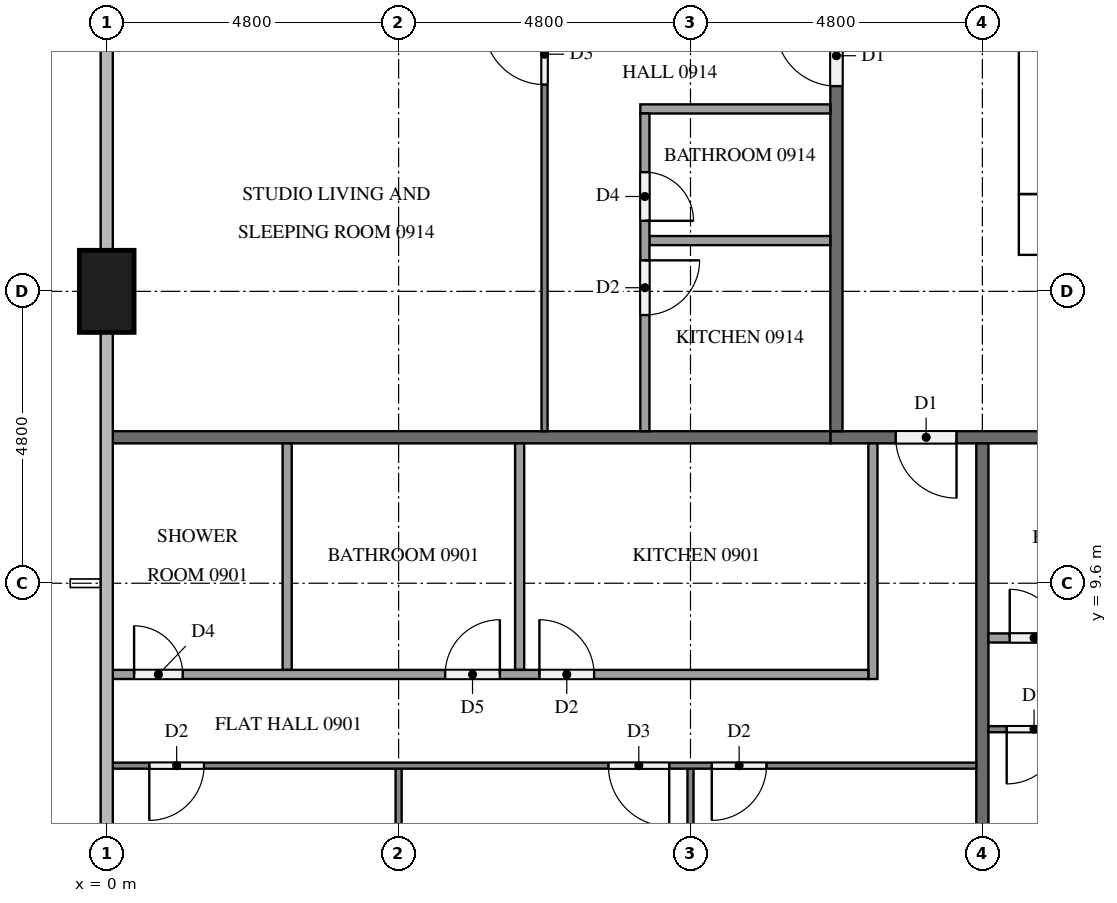
"""IFC4 building model, lengths in metres.
Left out: names, types, materials, properties, quantities, classifications, styles, units other than length and angle.
Written with IfcOpenShell. Run it as: python <this file> out.ifc"""

import sys

from ifc_helpers import new_model, si_unit, direction, frame, frame_2d, origin, origin_2d, place, context, subcontext, project, spatial, rectangle, extrude, element, fill, save


model = new_model("IFC4")
c1 = context("Model", 3, precision=1e-05, world=origin(), true_north=direction((0.0, 1.0)))
c2 = subcontext(c1, "Body", "Model", "MODEL_VIEW")
j1 = project(units=[si_unit("LENGTHUNIT", "METRE"), si_unit("PLANEANGLEUNIT", "RADIAN")], contexts=[c1])
p1 = place(None, origin())
s1 = spatial("IfcSite", under=j1, at=p1, CompositionType="ELEMENT")
p2 = place(p1, origin())
s2 = spatial("IfcBuilding", under=s1, at=p2, CompositionType="ELEMENT")
p3 = place(p2, frame((0.0, 0.0, 39.9)))
s3 = spatial("IfcBuildingStorey", under=s2, at=p3, CompositionType="ELEMENT", Elevation=39.9)
p4 = place(p3, frame((15.0, 15.5, 0.0), z_axis=(0.0, 0.0, 1.0), x_axis=(1.0, 0.0, 0.0)))
e1 = element("IfcWall", 1, at=p4, inside=s3, PredefinedType="SHEAR", context=c2, shape_type="SweptSolid", body=[
    extrude(rectangle(XDim=32.4, YDim=1.0, at=frame_2d((16.2, 0.0))), origin(), (0.0, 0.0, 1.0), 3.2),
])
p5 = place(p4, frame((15.3, 0.0, 0.0)))
e2 = element("IfcOpeningElement", 2, at=p5, cuts=e1, PredefinedType="OPENING", context=c2, shape_type="SweptSolid", body=[
    extrude(rectangle(XDim=1.8, YDim=2.1, at=frame_2d((0.9, 1.05))), frame((0.0, 0.51, 0.0), z_axis=(0.0, -1.0, 0.0), x_axis=(1.0, 0.0, 0.0)), (0.0, 0.0, 1.0), 1.02),
])
p6 = place(p3, frame((15.5, 16.0, 0.0), z_axis=(0.0, 0.0, 1.0), x_axis=(0.0, 1.0, 0.0)))
e3 = element("IfcWall", 3, at=p6, inside=s3, PredefinedType="SHEAR", context=c2, shape_type="SweptSolid", body=[
    extrude(rectangle(XDim=20.8, YDim=1.0, at=frame_2d((10.4, 0.0))), origin(), (0.0, 0.0, 1.0), 3.2),
])
p7 = place(p6, frame((4.76, 0.0, 0.0)))
e4 = element("IfcOpeningElement", 4, at=p7, cuts=e3, PredefinedType="OPENING", context=c2, shape_type="SweptSolid", body=[
    extrude(rectangle(XDim=1.2, YDim=2.1, at=frame_2d((0.6, 1.05))), frame((0.0, 0.51, 0.0), z_axis=(0.0, -1.0, 0.0), x_axis=(1.0, 0.0, 0.0)), (0.0, 0.0, 1.0), 1.02),
])
p8 = place(p3, frame((0.0, 14.4, 0.0), z_axis=(0.0, 0.0, 1.0), x_axis=(0.0, 1.0, 0.0)))
e5 = element("IfcColumn", 5, at=p8, inside=s3, PredefinedType="COLUMN", context=c2, shape_type="SweptSolid", body=[
    extrude(rectangle(XDim=1.35, YDim=0.9, at=origin_2d()), origin(), (0.0, 0.0, 1.0), 3.2),
])
p9 = place(p3, frame((50.5, 12.0, 0.0), z_axis=(0.0, 0.0, 1.0), x_axis=(-1.0, 0.0, 0.0)))
e6 = element("IfcWall", 6, at=p9, inside=s3, PredefinedType="PARTITIONING", context=c2, shape_type="SweptSolid", body=[
    extrude(rectangle(XDim=38.6, YDim=0.2, at=frame_2d((19.3, 0.0))), origin(), (0.0, 0.0, 1.0), 3.2),
])
p10 = place(p9, frame((36.525, 0.0, 0.0)))
e7 = element("IfcOpeningElement", 7, at=p10, cuts=e6, PredefinedType="OPENING", context=c2, shape_type="SweptSolid", body=[
    extrude(rectangle(XDim=1.0, YDim=2.1, at=frame_2d((0.5, 1.05))), frame((0.0, 0.11, 0.0), z_axis=(0.0, -1.0, 0.0), x_axis=(1.0, 0.0, 0.0)), (0.0, 0.0, 1.0), 0.22),
])
p11 = place(p9, frame((24.525, 0.0, 0.0)))
e8 = element("IfcOpeningElement", 8, at=p11, cuts=e6, PredefinedType="OPENING", context=c2, shape_type="SweptSolid", body=[
    extrude(rectangle(XDim=1.0, YDim=2.1, at=frame_2d((0.5, 1.05))), frame((0.0, 0.11, 0.0), z_axis=(0.0, -1.0, 0.0), x_axis=(1.0, 0.0, 0.0)), (0.0, 0.0, 1.0), 0.22),
])
p12 = place(p9, frame((22.675, 0.0, 0.0)))
e9 = element("IfcOpeningElement", 9, at=p12, cuts=e6, PredefinedType="OPENING", context=c2, shape_type="SweptSolid", body=[
    extrude(rectangle(XDim=1.0, YDim=2.1, at=frame_2d((0.5, 1.05))), frame((0.0, 0.11, 0.0), z_axis=(0.0, -1.0, 0.0), x_axis=(1.0, 0.0, 0.0)), (0.0, 0.0, 1.0), 0.22),
])
p13 = place(p9, frame((8.275, 0.0, 0.0)))
e10 = element("IfcOpeningElement", 10, at=p13, cuts=e6, PredefinedType="OPENING", context=c2, shape_type="SweptSolid", body=[
    extrude(rectangle(XDim=1.0, YDim=2.1, at=frame_2d((0.5, 1.05))), frame((0.0, 0.11, 0.0), z_axis=(0.0, -1.0, 0.0), x_axis=(1.0, 0.0, 0.0)), (0.0, 0.0, 1.0), 0.22),
])
p14 = place(p3, frame((12.0, 12.1, 0.0), z_axis=(0.0, 0.0, 1.0), x_axis=(0.0, 1.0, 0.0)))
e11 = element("IfcWall", 11, at=p14, inside=s3, PredefinedType="PARTITIONING", context=c2, shape_type="SweptSolid", body=[
    extrude(rectangle(XDim=28.6, YDim=0.2, at=frame_2d((14.3, 0.0))), origin(), (0.0, 0.0, 1.0), 3.2),
])
p15 = place(p14, frame((26.725, 0.0, 0.0)))
e12 = element("IfcOpeningElement", 12, at=p15, cuts=e11, PredefinedType="OPENING", context=c2, shape_type="SweptSolid", body=[
    extrude(rectangle(XDim=1.0, YDim=2.1, at=frame_2d((0.5, 1.05))), frame((0.0, 0.11, 0.0), z_axis=(0.0, -1.0, 0.0), x_axis=(1.0, 0.0, 0.0)), (0.0, 0.0, 1.0), 0.22),
])
p16 = place(p14, frame((17.125, 0.0, 0.0)))
e13 = element("IfcOpeningElement", 13, at=p16, cuts=e11, PredefinedType="OPENING", context=c2, shape_type="SweptSolid", body=[
    extrude(rectangle(XDim=1.0, YDim=2.1, at=frame_2d((0.5, 1.05))), frame((0.0, 0.11, 0.0), z_axis=(0.0, -1.0, 0.0), x_axis=(1.0, 0.0, 0.0)), (0.0, 0.0, 1.0), 0.22),
])
p17 = place(p14, frame((15.275, 0.0, 0.0)))
e14 = element("IfcOpeningElement", 14, at=p17, cuts=e11, PredefinedType="OPENING", context=c2, shape_type="SweptSolid", body=[
    extrude(rectangle(XDim=1.0, YDim=2.1, at=frame_2d((0.5, 1.05))), frame((0.0, 0.11, 0.0), z_axis=(0.0, -1.0, 0.0), x_axis=(1.0, 0.0, 0.0)), (0.0, 0.0, 1.0), 0.22),
])
p18 = place(p14, frame((5.675, 0.0, 0.0)))
e15 = element("IfcOpeningElement", 15, at=p18, cuts=e11, PredefinedType="OPENING", context=c2, shape_type="SweptSolid", body=[
    extrude(rectangle(XDim=1.0, YDim=2.1, at=frame_2d((0.5, 1.05))), frame((0.0, 0.11, 0.0), z_axis=(0.0, -1.0, 0.0), x_axis=(1.0, 0.0, 0.0)), (0.0, 0.0, 1.0), 0.22),
])
p19 = place(p3, frame((14.4, 11.9, 0.0), z_axis=(0.0, 0.0, 1.0), x_axis=(0.0, -1.0, 0.0)))
e16 = element("IfcWall", 16, at=p19, inside=s3, PredefinedType="PARTITIONING", context=c2, shape_type="SweptSolid", body=[
    extrude(rectangle(XDim=11.45, YDim=0.2, at=frame_2d((5.725, 0.0))), origin(), (0.0, 0.0, 1.0), 3.2),
])
p20 = place(p3, frame((0.1, 12.0, 0.0), z_axis=(0.0, 0.0, 1.0), x_axis=(1.0, 0.0, 0.0)))
e17 = element("IfcWall", 17, at=p20, inside=s3, PredefinedType="PARTITIONING", context=c2, shape_type="SweptSolid", body=[
    extrude(rectangle(XDim=11.8, YDim=0.2, at=frame_2d((5.9, 0.0))), origin(), (0.0, 0.0, 1.0), 3.2),
])
p21 = place(p3, frame((9.6, 6.55, 0.0), z_axis=(0.0, 0.0, 1.0), x_axis=(0.0, -1.0, 0.0)))
e18 = element("IfcWall", 18, at=p21, inside=s3, PredefinedType="PARTITIONING", context=c2, shape_type="SweptSolid", body=[
    extrude(rectangle(XDim=6.45, YDim=0.1, at=frame_2d((3.225, 0.0))), origin(), (0.0, 0.0, 1.0), 3.2),
])
p22 = place(p3, frame((4.8, 6.55, 0.0), z_axis=(0.0, 0.0, 1.0), x_axis=(0.0, -1.0, 0.0)))
e19 = element("IfcWall", 19, at=p22, inside=s3, PredefinedType="PARTITIONING", context=c2, shape_type="SweptSolid", body=[
    extrude(rectangle(XDim=5.925, YDim=0.1, at=frame_2d((2.962, 0.0))), origin(), (0.0, 0.0, 1.0), 3.2),
])
p23 = place(p3, frame((14.3, 6.6, 0.0), z_axis=(0.0, 0.0, 1.0), x_axis=(-1.0, 0.0, 0.0)))
e20 = element("IfcWall", 20, at=p23, inside=s3, PredefinedType="PARTITIONING", context=c2, shape_type="SweptSolid", body=[
    extrude(rectangle(XDim=14.2, YDim=0.1, at=frame_2d((7.1, 0.0))), origin(), (0.0, 0.0, 1.0), 3.2),
])
p24 = place(p23, frame((3.45, 0.0, 0.0)))
e21 = element("IfcOpeningElement", 21, at=p24, cuts=e20, PredefinedType="OPENING", context=c2, shape_type="SweptSolid", body=[
    extrude(rectangle(XDim=0.9, YDim=2.1, at=frame_2d((0.45, 1.05))), frame((0.0, 0.06, 0.0), z_axis=(0.0, -1.0, 0.0), x_axis=(1.0, 0.0, 0.0)), (0.0, 0.0, 1.0), 0.12),
])
p25 = place(p23, frame((5.05, 0.0, 0.0)))
e22 = element("IfcOpeningElement", 22, at=p25, cuts=e20, PredefinedType="OPENING", context=c2, shape_type="SweptSolid", body=[
    extrude(rectangle(XDim=1.0, YDim=2.1, at=frame_2d((0.5, 1.05))), frame((0.0, 0.06, 0.0), z_axis=(0.0, -1.0, 0.0), x_axis=(1.0, 0.0, 0.0)), (0.0, 0.0, 1.0), 0.12),
])
p26 = place(p23, frame((12.7, 0.0, 0.0)))
e23 = element("IfcOpeningElement", 23, at=p26, cuts=e20, PredefinedType="OPENING", context=c2, shape_type="SweptSolid", body=[
    extrude(rectangle(XDim=0.9, YDim=2.1, at=frame_2d((0.45, 1.05))), frame((0.0, 0.06, 0.0), z_axis=(0.0, -1.0, 0.0), x_axis=(1.0, 0.0, 0.0)), (0.0, 0.0, 1.0), 0.12),
])
for number, where, z_axis, x_axis in (
    (24, (6.79, 11.9, 0.0), (0.0, 0.0, 1.0), (0.0, -1.0, 0.0)),
    (25, (2.967, 11.9, 0.0), (0.0, 0.0, 1.0), (0.0, -1.0, 0.0)),
):
    element("IfcWall", number, at=place(p3, frame(where, z_axis=z_axis, x_axis=x_axis)), inside=s3, PredefinedType="PARTITIONING", context=c2, shape_type="SweptSolid", body=[
        extrude(rectangle(XDim=3.725, YDim=0.15, at=frame_2d((1.862, 0.0))), origin(), (0.0, 0.0, 1.0), 3.2),
    ])
p27 = place(p3, frame((12.6, 11.9, 0.0), z_axis=(0.0, 0.0, 1.0), x_axis=(0.0, -1.0, 0.0)))
e26 = element("IfcWall", 26, at=p27, inside=s3, PredefinedType="PARTITIONING", context=c2, shape_type="SweptSolid", body=[
    extrude(rectangle(XDim=3.875, YDim=0.15, at=frame_2d((1.938, 0.0))), origin(), (0.0, 0.0, 1.0), 3.2),
])
p28 = place(p3, frame((0.1, 8.1, 0.0), z_axis=(0.0, 0.0, 1.0), x_axis=(1.0, 0.0, 0.0)))
e27 = element("IfcWall", 27, at=p28, inside=s3, PredefinedType="PARTITIONING", context=c2, shape_type="SweptSolid", body=[
    extrude(rectangle(XDim=12.425, YDim=0.15, at=frame_2d((6.212, 0.0))), origin(), (0.0, 0.0, 1.0), 3.2),
])
p29 = place(p28, frame((7.015, 0.0, 0.0)))
e28 = element("IfcOpeningElement", 28, at=p29, cuts=e27, PredefinedType="OPENING", context=c2, shape_type="SweptSolid", body=[
    extrude(rectangle(XDim=0.9, YDim=2.1, at=frame_2d((0.45, 1.05))), frame((0.0, 0.085, 0.0), z_axis=(0.0, -1.0, 0.0), x_axis=(1.0, 0.0, 0.0)), (0.0, 0.0, 1.0), 0.17),
])
p30 = place(p28, frame((5.465, 0.0, 0.0)))
e29 = element("IfcOpeningElement", 29, at=p30, cuts=e27, PredefinedType="OPENING", context=c2, shape_type="SweptSolid", body=[
    extrude(rectangle(XDim=0.9, YDim=2.1, at=frame_2d((0.45, 1.05))), frame((0.0, 0.085, 0.0), z_axis=(0.0, -1.0, 0.0), x_axis=(1.0, 0.0, 0.0)), (0.0, 0.0, 1.0), 0.17),
])
p31 = place(p28, frame((0.35, 0.0, 0.0)))
e30 = element("IfcOpeningElement", 30, at=p31, cuts=e27, PredefinedType="OPENING", context=c2, shape_type="SweptSolid", body=[
    extrude(rectangle(XDim=0.8, YDim=2.1, at=frame_2d((0.4, 1.05))), frame((0.0, 0.085, 0.0), z_axis=(0.0, -1.0, 0.0), x_axis=(1.0, 0.0, 0.0)), (0.0, 0.0, 1.0), 0.17),
])
p32 = place(p3, frame((26.3, 7.2, 0.0), z_axis=(0.0, 0.0, 1.0), x_axis=(-1.0, 0.0, 0.0)))
e31 = element("IfcWall", 31, at=p32, inside=s3, PredefinedType="PARTITIONING", context=c2, shape_type="SweptSolid", body=[
    extrude(rectangle(XDim=11.8, YDim=0.1, at=frame_2d((5.9, 0.0))), origin(), (0.0, 0.0, 1.0), 3.2),
])
p33 = place(p32, frame((0.3, 0.0, 0.0)))
e32 = element("IfcOpeningElement", 32, at=p33, cuts=e31, PredefinedType="OPENING", context=c2, shape_type="SweptSolid", body=[
    extrude(rectangle(XDim=1.0, YDim=2.1, at=frame_2d((0.5, 1.05))), frame((0.0, 0.06, 0.0), z_axis=(0.0, -1.0, 0.0), x_axis=(1.0, 0.0, 0.0)), (0.0, 0.0, 1.0), 0.12),
])
p34 = place(p32, frame((10.6, 0.0, 0.0)))
e33 = element("IfcOpeningElement", 33, at=p34, cuts=e31, PredefinedType="OPENING", context=c2, shape_type="SweptSolid", body=[
    extrude(rectangle(XDim=0.9, YDim=2.1, at=frame_2d((0.45, 1.05))), frame((0.0, 0.06, 0.0), z_axis=(0.0, -1.0, 0.0), x_axis=(1.0, 0.0, 0.0)), (0.0, 0.0, 1.0), 0.12),
])
p35 = place(p3, frame((14.5, 8.7, 0.0), z_axis=(0.0, 0.0, 1.0), x_axis=(1.0, 0.0, 0.0)))
e34 = element("IfcWall", 34, at=p35, inside=s3, PredefinedType="PARTITIONING", context=c2, shape_type="SweptSolid", body=[
    extrude(rectangle(XDim=10.025, YDim=0.15, at=frame_2d((5.012, 0.0))), origin(), (0.0, 0.0, 1.0), 3.2),
])
p36 = place(p35, frame((8.825, 0.0, 0.0)))
e35 = element("IfcOpeningElement", 35, at=p36, cuts=e34, PredefinedType="OPENING", context=c2, shape_type="SweptSolid", body=[
    extrude(rectangle(XDim=0.9, YDim=2.1, at=frame_2d((0.45, 1.05))), frame((0.0, 0.085, 0.0), z_axis=(0.0, -1.0, 0.0), x_axis=(1.0, 0.0, 0.0)), (0.0, 0.0, 1.0), 0.17),
])
p37 = place(p35, frame((0.35, 0.0, 0.0)))
e36 = element("IfcOpeningElement", 36, at=p37, cuts=e34, PredefinedType="OPENING", context=c2, shape_type="SweptSolid", body=[
    extrude(rectangle(XDim=0.8, YDim=2.1, at=frame_2d((0.4, 1.05))), frame((0.0, 0.085, 0.0), z_axis=(0.0, -1.0, 0.0), x_axis=(1.0, 0.0, 0.0)), (0.0, 0.0, 1.0), 0.17),
])
p38 = place(p3, frame((7.2, 12.1, 0.0), z_axis=(0.0, 0.0, 1.0), x_axis=(0.0, 1.0, 0.0)))
e37 = element("IfcWall", 37, at=p38, inside=s3, PredefinedType="PARTITIONING", context=c2, shape_type="SweptSolid", body=[
    extrude(rectangle(XDim=7.0, YDim=0.1, at=frame_2d((3.5, 0.0))), origin(), (0.0, 0.0, 1.0), 3.2),
])
p39 = place(p38, frame((5.7, 0.0, 0.0)))
e38 = element("IfcOpeningElement", 38, at=p39, cuts=e37, PredefinedType="OPENING", context=c2, shape_type="SweptSolid", body=[
    extrude(rectangle(XDim=1.0, YDim=2.1, at=frame_2d((0.5, 1.05))), frame((0.0, 0.06, 0.0), z_axis=(0.0, -1.0, 0.0), x_axis=(1.0, 0.0, 0.0)), (0.0, 0.0, 1.0), 0.12),
])
p40 = place(p3, frame((11.9, 15.235, 0.0), z_axis=(0.0, 0.0, 1.0), x_axis=(-1.0, 0.0, 0.0)))
e39 = element("IfcWall", 39, at=p40, inside=s3, PredefinedType="PARTITIONING", context=c2, shape_type="SweptSolid", body=[
    extrude(rectangle(XDim=2.975, YDim=0.15, at=frame_2d((1.487, 0.0))), origin(), (0.0, 0.0, 1.0), 3.2),
])
p41 = place(p3, frame((11.9, 17.4, 0.0), z_axis=(0.0, 0.0, 1.0), x_axis=(-1.0, 0.0, 0.0)))
e40 = element("IfcWall", 40, at=p41, inside=s3, PredefinedType="PARTITIONING", context=c2, shape_type="SweptSolid", body=[
    extrude(rectangle(XDim=3.125, YDim=0.15, at=frame_2d((1.562, 0.0))), origin(), (0.0, 0.0, 1.0), 3.2),
])
p42 = place(p3, frame((8.85, 17.325, 0.0), z_axis=(0.0, 0.0, 1.0), x_axis=(0.0, -1.0, 0.0)))
e41 = element("IfcWall", 41, at=p42, inside=s3, PredefinedType="PARTITIONING", context=c2, shape_type="SweptSolid", body=[
    extrude(rectangle(XDim=5.225, YDim=0.15, at=frame_2d((2.612, 0.0))), origin(), (0.0, 0.0, 1.0), 3.2),
])
p43 = place(p42, frame((0.965, 0.0, 0.0)))
e42 = element("IfcOpeningElement", 42, at=p43, cuts=e41, PredefinedType="OPENING", context=c2, shape_type="SweptSolid", body=[
    extrude(rectangle(XDim=0.8, YDim=2.1, at=frame_2d((0.4, 1.05))), frame((0.0, 0.085, 0.0), z_axis=(0.0, -1.0, 0.0), x_axis=(1.0, 0.0, 0.0)), (0.0, 0.0, 1.0), 0.17),
])
p44 = place(p42, frame((2.415, 0.0, 0.0)))
e43 = element("IfcOpeningElement", 43, at=p44, cuts=e41, PredefinedType="OPENING", context=c2, shape_type="SweptSolid", body=[
    extrude(rectangle(XDim=0.9, YDim=2.1, at=frame_2d((0.45, 1.05))), frame((0.0, 0.085, 0.0), z_axis=(0.0, -1.0, 0.0), x_axis=(1.0, 0.0, 0.0)), (0.0, 0.0, 1.0), 0.17),
])
p45 = place(p10, origin())
e44 = element("IfcDoor", 44, at=p45, inside=s3, OperationType="SINGLE_SWING_LEFT", PredefinedType="DOOR", context=c2, shape_type="SweptSolid", body=[
    extrude(rectangle(XDim=1.0, YDim=2.1, at=frame_2d((0.5, 1.05))), frame((0.0, 0.025, 0.0), z_axis=(0.0, -1.0, 0.0), x_axis=(1.0, 0.0, 0.0)), (0.0, 0.0, 1.0), 0.05),
])
fill(e7, e44)
p46 = place(p18, origin())
e45 = element("IfcDoor", 45, at=p46, inside=s3, OperationType="SINGLE_SWING_RIGHT", PredefinedType="DOOR", context=c2, shape_type="SweptSolid", body=[
    extrude(rectangle(XDim=1.0, YDim=2.1, at=frame_2d((0.5, 1.05))), frame((0.0, 0.025, 0.0), z_axis=(0.0, -1.0, 0.0), x_axis=(1.0, 0.0, 0.0)), (0.0, 0.0, 1.0), 0.05),
])
fill(e15, e45)
p47 = place(p24, origin())
e46 = element("IfcDoor", 46, at=p47, inside=s3, OperationType="SINGLE_SWING_RIGHT", PredefinedType="DOOR", context=c2, shape_type="SweptSolid", body=[
    extrude(rectangle(XDim=0.9, YDim=2.1, at=frame_2d((0.45, 1.05))), frame((0.0, 0.025, 0.0), z_axis=(0.0, -1.0, 0.0), x_axis=(1.0, 0.0, 0.0)), (0.0, 0.0, 1.0), 0.05),
])
fill(e21, e46)
p48 = place(p25, origin())
e47 = element("IfcDoor", 47, at=p48, inside=s3, OperationType="SINGLE_SWING_LEFT", PredefinedType="DOOR", context=c2, shape_type="SweptSolid", body=[
    extrude(rectangle(XDim=1.0, YDim=2.1, at=frame_2d((0.5, 1.05))), frame((0.0, 0.025, 0.0), z_axis=(0.0, -1.0, 0.0), x_axis=(1.0, 0.0, 0.0)), (0.0, 0.0, 1.0), 0.05),
])
fill(e22, e47)
p49 = place(p26, origin())
e48 = element("IfcDoor", 48, at=p49, inside=s3, OperationType="SINGLE_SWING_RIGHT", PredefinedType="DOOR", context=c2, shape_type="SweptSolid", body=[
    extrude(rectangle(XDim=0.9, YDim=2.1, at=frame_2d((0.45, 1.05))), frame((0.0, 0.025, 0.0), z_axis=(0.0, -1.0, 0.0), x_axis=(1.0, 0.0, 0.0)), (0.0, 0.0, 1.0), 0.05),
])
fill(e23, e48)
p50 = place(p29, origin())
e49 = element("IfcDoor", 49, at=p50, inside=s3, OperationType="SINGLE_SWING_LEFT", PredefinedType="DOOR", context=c2, shape_type="SweptSolid", body=[
    extrude(rectangle(XDim=0.9, YDim=2.1, at=frame_2d((0.45, 1.05))), frame((0.0, 0.025, 0.0), z_axis=(0.0, -1.0, 0.0), x_axis=(1.0, 0.0, 0.0)), (0.0, 0.0, 1.0), 0.05),
])
fill(e28, e49)
p51 = place(p30, origin())
e50 = element("IfcDoor", 50, at=p51, inside=s3, OperationType="SINGLE_SWING_RIGHT", PredefinedType="DOOR", context=c2, shape_type="SweptSolid", body=[
    extrude(rectangle(XDim=0.9, YDim=2.1, at=frame_2d((0.45, 1.05))), frame((0.0, 0.025, 0.0), z_axis=(0.0, -1.0, 0.0), x_axis=(1.0, 0.0, 0.0)), (0.0, 0.0, 1.0), 0.05),
])
fill(e29, e50)
p52 = place(p31, origin())
e51 = element("IfcDoor", 51, at=p52, inside=s3, OperationType="SINGLE_SWING_LEFT", PredefinedType="DOOR", context=c2, shape_type="SweptSolid", body=[
    extrude(rectangle(XDim=0.8, YDim=2.1, at=frame_2d((0.4, 1.05))), frame((0.0, 0.025, 0.0), z_axis=(0.0, -1.0, 0.0), x_axis=(1.0, 0.0, 0.0)), (0.0, 0.0, 1.0), 0.05),
])
fill(e30, e51)
p53 = place(p34, origin())
e52 = element("IfcDoor", 52, at=p53, inside=s3, OperationType="SINGLE_SWING_RIGHT", PredefinedType="DOOR", context=c2, shape_type="SweptSolid", body=[
    extrude(rectangle(XDim=0.9, YDim=2.1, at=frame_2d((0.45, 1.05))), frame((0.0, 0.025, 0.0), z_axis=(0.0, -1.0, 0.0), x_axis=(1.0, 0.0, 0.0)), (0.0, 0.0, 1.0), 0.05),
])
fill(e33, e52)
p54 = place(p37, origin())
e53 = element("IfcDoor", 53, at=p54, inside=s3, OperationType="SINGLE_SWING_LEFT", PredefinedType="DOOR", context=c2, shape_type="SweptSolid", body=[
    extrude(rectangle(XDim=0.8, YDim=2.1, at=frame_2d((0.4, 1.05))), frame((0.0, 0.025, 0.0), z_axis=(0.0, -1.0, 0.0), x_axis=(1.0, 0.0, 0.0)), (0.0, 0.0, 1.0), 0.05),
])
fill(e36, e53)
p55 = place(p39, origin())
e54 = element("IfcDoor", 54, at=p55, inside=s3, OperationType="SINGLE_SWING_RIGHT", PredefinedType="DOOR", context=c2, shape_type="SweptSolid", body=[
    extrude(rectangle(XDim=1.0, YDim=2.1, at=frame_2d((0.5, 1.05))), frame((0.0, 0.025, 0.0), z_axis=(0.0, -1.0, 0.0), x_axis=(1.0, 0.0, 0.0)), (0.0, 0.0, 1.0), 0.05),
])
fill(e38, e54)
p56 = place(p43, origin())
e55 = element("IfcDoor", 55, at=p56, inside=s3, OperationType="SINGLE_SWING_RIGHT", PredefinedType="DOOR", context=c2, shape_type="SweptSolid", body=[
    extrude(rectangle(XDim=0.8, YDim=2.1, at=frame_2d((0.4, 1.05))), frame((0.0, 0.025, 0.0), z_axis=(0.0, -1.0, 0.0), x_axis=(1.0, 0.0, 0.0)), (0.0, 0.0, 1.0), 0.05),
])
fill(e42, e55)
p57 = place(p44, origin())
e56 = element("IfcDoor", 56, at=p57, inside=s3, OperationType="SINGLE_SWING_LEFT", PredefinedType="DOOR", context=c2, shape_type="SweptSolid", body=[
    extrude(rectangle(XDim=0.9, YDim=2.1, at=frame_2d((0.45, 1.05))), frame((0.0, 0.025, 0.0), z_axis=(0.0, -1.0, 0.0), x_axis=(1.0, 0.0, 0.0)), (0.0, 0.0, 1.0), 0.05),
])
fill(e43, e56)
save(model, sys.argv[1])
